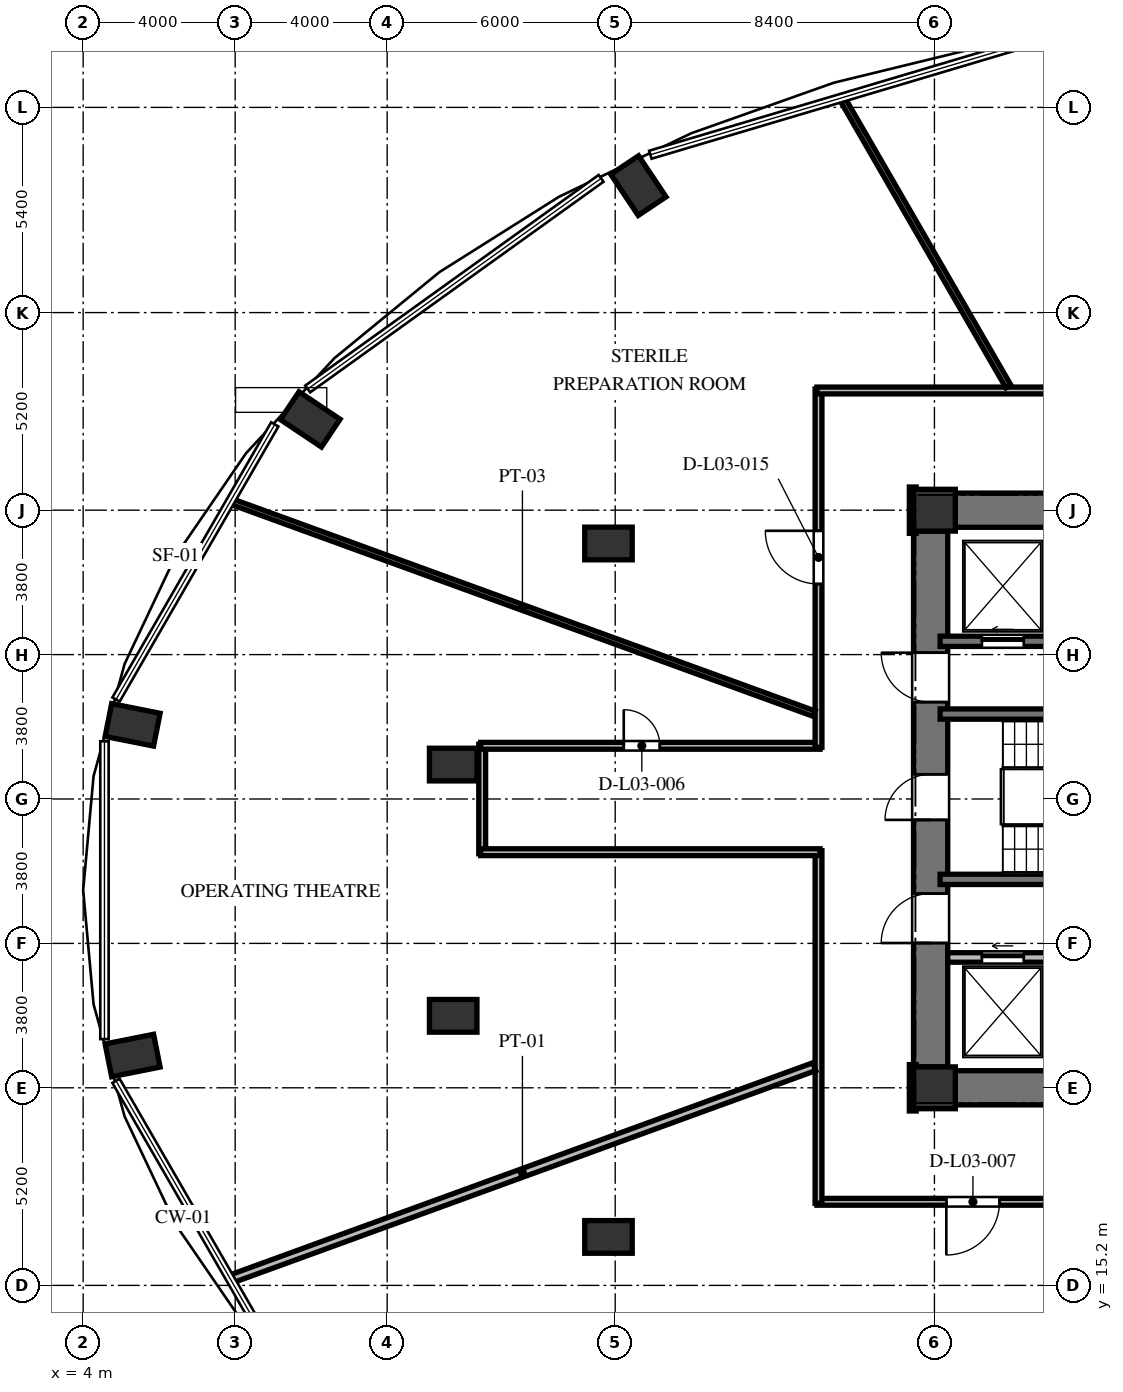
"""IFC4 building model, lengths in metres.
Left out: names, types, materials, properties, quantities, classifications, styles, units other than length and angle.
Written with IfcOpenShell. Run it as: python <this file> out.ifc"""

import sys

from ifc_helpers import new_model, si_unit, direction, frame, frame_2d, origin, origin_2d, place, context, subcontext, project, spatial, rectangle, extrude, element, fill, save


model = new_model("IFC4")
c1 = context("Model", 3, precision=1e-05, world=origin(), true_north=direction((0.0, 1.0)))
c2 = subcontext(c1, "Body", "Model", "MODEL_VIEW")
j1 = project(units=[si_unit("LENGTHUNIT", "METRE"), si_unit("PLANEANGLEUNIT", "RADIAN")], contexts=[c1])
p1 = place(None, origin())
s1 = spatial("IfcSite", under=j1, at=p1, CompositionType="ELEMENT")
p2 = place(p1, origin())
s2 = spatial("IfcBuilding", under=s1, at=p2, CompositionType="ELEMENT")
p3 = place(p2, frame((0.0, 0.0, 15.6)))
s3 = spatial("IfcBuildingStorey", under=s2, at=p3, CompositionType="ELEMENT", Elevation=15.6)
for number, where, z_axis, x_axis in (
    (1, (18.611, 44.142, 0.0), (0.0, 0.0, 1.0), (-0.556, 0.831, 0.0)),
    (2, (9.975, 37.989, 0.0), (0.0, 0.0, 1.0), (-0.831, 0.556, 0.0)),
    (3, (5.302, 29.95, 0.0), (0.0, 0.0, 1.0), (-0.981, 0.195, 0.0)),
    (4, (5.302, 21.25, 0.0), (0.0, 0.0, 1.0), (-0.981, -0.195, 0.0)),
):
    element("IfcColumn", number, at=place(p3, frame(where, z_axis=z_axis, x_axis=x_axis)), inside=s3, PredefinedType="COLUMN", context=c2, shape_type="SweptSolid", body=[
        extrude(rectangle(XDim=1.3, YDim=0.88, at=origin_2d()), origin(), (0.0, 0.0, 1.0), 4.8),
    ])
for number, where, z_axis, x_axis in (
    (5, (26.4, 20.4, 0.0), (0.0, 0.0, 1.0), (1.0, 0.0, 0.0)),
    (6, (26.4, 35.6, 0.0), (0.0, 0.0, 1.0), (1.0, 0.0, 0.0)),
):
    element("IfcColumn", number, at=place(p3, frame(where, z_axis=z_axis, x_axis=x_axis)), inside=s3, PredefinedType="COLUMN", context=c2, shape_type="SweptSolid", body=[
        extrude(rectangle(XDim=1.1, YDim=1.1, at=origin_2d()), origin(), (0.0, 0.0, 1.0), 4.8),
    ])
for number, where, z_axis, x_axis in (
    (7, (17.823, 34.724, 0.0), (0.0, 0.0, 1.0), (1.0, 0.0, 0.0)),
    (8, (13.737, 28.906, 0.0), (0.0, 0.0, 1.0), (1.0, 0.0, 0.0)),
    (9, (13.737, 22.294, 0.0), (0.0, 0.0, 1.0), (1.0, 0.0, 0.0)),
    (10, (17.823, 16.476, 0.0), (0.0, 0.0, 1.0), (1.0, 0.0, 0.0)),
):
    element("IfcColumn", number, at=place(p3, frame(where, z_axis=z_axis, x_axis=x_axis)), inside=s3, PredefinedType="COLUMN", context=c2, shape_type="SweptSolid", body=[
        extrude(rectangle(XDim=1.25, YDim=0.86, at=origin_2d()), origin(), (0.0, 0.0, 1.0), 4.8),
    ])
p4 = place(p3, frame((26.3, 20.95, 0.0), z_axis=(0.0, 0.0, 1.0), x_axis=(0.0, 1.0, 0.0)))
e11 = element("IfcWall", 11, at=p4, inside=s3, PredefinedType="SHEAR", context=c2, shape_type="SweptSolid", body=[
    extrude(rectangle(XDim=14.1, YDim=0.9, at=frame_2d((7.05, 0.0))), origin(), (0.0, 0.0, 1.0), 4.8),
])
p5 = place(p4, frame((6.5, 0.0, 0.0)))
e12 = element("IfcOpeningElement", 12, at=p5, cuts=e11, PredefinedType="OPENING", context=c2, shape_type="SweptSolid", body=[
    extrude(rectangle(XDim=1.2, YDim=2.15, at=frame_2d((0.6, 1.075))), frame((0.0, 0.46, 0.0), z_axis=(0.0, -1.0, 0.0), x_axis=(1.0, 0.0, 0.0)), (0.0, 0.0, 1.0), 0.92),
])
p6 = place(p4, frame((9.6, 0.0, 0.0)))
e13 = element("IfcOpeningElement", 13, at=p6, cuts=e11, PredefinedType="OPENING", context=c2, shape_type="SweptSolid", body=[
    extrude(rectangle(XDim=1.3, YDim=2.2, at=frame_2d((0.65, 1.1))), frame((0.0, 0.46, 0.0), z_axis=(0.0, -1.0, 0.0), x_axis=(1.0, 0.0, 0.0)), (0.0, 0.0, 1.0), 0.92),
])
p7 = place(p4, frame((3.26, 0.0, 0.0)))
e14 = element("IfcOpeningElement", 14, at=p7, cuts=e11, PredefinedType="OPENING", context=c2, shape_type="SweptSolid", body=[
    extrude(rectangle(XDim=1.3, YDim=2.2, at=frame_2d((0.65, 1.1))), frame((0.0, 0.46, 0.0), z_axis=(0.0, -1.0, 0.0), x_axis=(1.0, 0.0, 0.0)), (0.0, 0.0, 1.0), 0.92),
])
for number, where, z_axis, x_axis in (
    (15, (26.95, 20.4, 0.0), (0.0, 0.0, 1.0), (1.0, 0.0, 0.0)),
    (16, (26.95, 35.6, 0.0), (0.0, 0.0, 1.0), (1.0, 0.0, 0.0)),
):
    element("IfcWall", number, at=place(p3, frame(where, z_axis=z_axis, x_axis=x_axis)), inside=s3, PredefinedType="SHEAR", context=c2, shape_type="SweptSolid", body=[
        extrude(rectangle(XDim=5.3, YDim=0.9, at=frame_2d((2.65, 0.0))), origin(), (0.0, 0.0, 1.0), 4.8),
    ])
for number, where, z_axis, x_axis in (
    (17, (26.55, 30.235, 0.0), (0.0, 0.0, 1.0), (1.0, 0.0, 0.0)),
    (18, (26.55, 25.885, 0.0), (0.0, 0.0, 1.0), (1.0, 0.0, 0.0)),
):
    element("IfcWall", number, at=place(p3, frame(where, z_axis=z_axis, x_axis=x_axis)), inside=s3, PredefinedType="SHEAR", context=c2, shape_type="SweptSolid", body=[
        extrude(rectangle(XDim=7.985, YDim=0.27, at=frame_2d((3.992, 0.0))), origin(), (0.0, 0.0, 1.0), 4.8),
    ])
p8 = place(p3, frame((26.55, 32.15, 0.0), z_axis=(0.0, 0.0, 1.0), x_axis=(1.0, 0.0, 0.0)))
e19 = element("IfcWall", 19, at=p8, inside=s3, PredefinedType="SHEAR", context=c2, shape_type="SweptSolid", body=[
    extrude(rectangle(XDim=16.4, YDim=0.27, at=frame_2d((8.2, 0.0))), origin(), (0.0, 0.0, 1.0), 4.8),
])
p9 = place(p8, frame((1.1, 0.0, 0.0)))
e20 = element("IfcOpeningElement", 20, at=p9, cuts=e19, PredefinedType="OPENING", context=c2, shape_type="SweptSolid", body=[
    extrude(rectangle(XDim=1.1, YDim=2.2, at=frame_2d((0.55, 1.1))), frame((0.0, 0.145, 0.0), z_axis=(0.0, -1.0, 0.0), x_axis=(1.0, 0.0, 0.0)), (0.0, 0.0, 1.0), 0.29),
])
p10 = place(p8, frame((3.7, 0.0, 0.0)))
e21 = element("IfcOpeningElement", 21, at=p10, cuts=e19, PredefinedType="OPENING", context=c2, shape_type="SweptSolid", body=[
    extrude(rectangle(XDim=1.1, YDim=2.2, at=frame_2d((0.55, 1.1))), frame((0.0, 0.145, 0.0), z_axis=(0.0, -1.0, 0.0), x_axis=(1.0, 0.0, 0.0)), (0.0, 0.0, 1.0), 0.29),
])
p11 = place(p8, frame((6.5, 0.0, 0.0)))
e22 = element("IfcOpeningElement", 22, at=p11, cuts=e19, PredefinedType="OPENING", context=c2, shape_type="SweptSolid", body=[
    extrude(rectangle(XDim=1.1, YDim=2.2, at=frame_2d((0.55, 1.1))), frame((0.0, 0.145, 0.0), z_axis=(0.0, -1.0, 0.0), x_axis=(1.0, 0.0, 0.0)), (0.0, 0.0, 1.0), 0.29),
])
p12 = place(p8, frame((9.1, 0.0, 0.0)))
e23 = element("IfcOpeningElement", 23, at=p12, cuts=e19, PredefinedType="OPENING", context=c2, shape_type="SweptSolid", body=[
    extrude(rectangle(XDim=1.1, YDim=2.2, at=frame_2d((0.55, 1.1))), frame((0.0, 0.145, 0.0), z_axis=(0.0, -1.0, 0.0), x_axis=(1.0, 0.0, 0.0)), (0.0, 0.0, 1.0), 0.29),
])
p13 = place(p8, frame((11.9, 0.0, 0.0)))
e24 = element("IfcOpeningElement", 24, at=p13, cuts=e19, PredefinedType="OPENING", context=c2, shape_type="SweptSolid", body=[
    extrude(rectangle(XDim=1.1, YDim=2.2, at=frame_2d((0.55, 1.1))), frame((0.0, 0.145, 0.0), z_axis=(0.0, -1.0, 0.0), x_axis=(1.0, 0.0, 0.0)), (0.0, 0.0, 1.0), 0.29),
])
p14 = place(p8, frame((14.5, 0.0, 0.0)))
e25 = element("IfcOpeningElement", 25, at=p14, cuts=e19, PredefinedType="OPENING", context=c2, shape_type="SweptSolid", body=[
    extrude(rectangle(XDim=1.1, YDim=2.2, at=frame_2d((0.55, 1.1))), frame((0.0, 0.145, 0.0), z_axis=(0.0, -1.0, 0.0), x_axis=(1.0, 0.0, 0.0)), (0.0, 0.0, 1.0), 0.29),
])
p15 = place(p3, frame((26.75, 23.83, 0.0), z_axis=(0.0, 0.0, 1.0), x_axis=(1.0, 0.0, 0.0)))
e26 = element("IfcWall", 26, at=p15, inside=s3, PredefinedType="SOLIDWALL", context=c2, shape_type="SweptSolid", body=[
    extrude(rectangle(XDim=16.2, YDim=0.25, at=frame_2d((8.1, 0.0))), origin(), (0.0, 0.0, 1.0), 4.52),
])
p16 = place(p15, frame((0.9, 0.0, 0.0)))
e27 = element("IfcOpeningElement", 27, at=p16, cuts=e26, PredefinedType="OPENING", context=c2, shape_type="SweptSolid", body=[
    extrude(rectangle(XDim=1.1, YDim=2.2, at=frame_2d((0.55, 1.1))), frame((0.0, 0.135, 0.0), z_axis=(0.0, -1.0, 0.0), x_axis=(1.0, 0.0, 0.0)), (0.0, 0.0, 1.0), 0.27),
])
p17 = place(p15, frame((3.5, 0.0, 0.0)))
e28 = element("IfcOpeningElement", 28, at=p17, cuts=e26, PredefinedType="OPENING", context=c2, shape_type="SweptSolid", body=[
    extrude(rectangle(XDim=1.1, YDim=2.2, at=frame_2d((0.55, 1.1))), frame((0.0, 0.135, 0.0), z_axis=(0.0, -1.0, 0.0), x_axis=(1.0, 0.0, 0.0)), (0.0, 0.0, 1.0), 0.27),
])
p18 = place(p15, frame((6.3, 0.0, 0.0)))
e29 = element("IfcOpeningElement", 29, at=p18, cuts=e26, PredefinedType="OPENING", context=c2, shape_type="SweptSolid", body=[
    extrude(rectangle(XDim=1.1, YDim=2.2, at=frame_2d((0.55, 1.1))), frame((0.0, 0.135, 0.0), z_axis=(0.0, -1.0, 0.0), x_axis=(1.0, 0.0, 0.0)), (0.0, 0.0, 1.0), 0.27),
])
p19 = place(p15, frame((8.9, 0.0, 0.0)))
e30 = element("IfcOpeningElement", 30, at=p19, cuts=e26, PredefinedType="OPENING", context=c2, shape_type="SweptSolid", body=[
    extrude(rectangle(XDim=1.1, YDim=2.2, at=frame_2d((0.55, 1.1))), frame((0.0, 0.135, 0.0), z_axis=(0.0, -1.0, 0.0), x_axis=(1.0, 0.0, 0.0)), (0.0, 0.0, 1.0), 0.27),
])
p20 = place(p15, frame((11.7, 0.0, 0.0)))
e31 = element("IfcOpeningElement", 31, at=p20, cuts=e26, PredefinedType="OPENING", context=c2, shape_type="SweptSolid", body=[
    extrude(rectangle(XDim=1.1, YDim=2.2, at=frame_2d((0.55, 1.1))), frame((0.0, 0.135, 0.0), z_axis=(0.0, -1.0, 0.0), x_axis=(1.0, 0.0, 0.0)), (0.0, 0.0, 1.0), 0.27),
])
p21 = place(p15, frame((14.15, 0.0, 0.0)))
e32 = element("IfcOpeningElement", 32, at=p21, cuts=e26, PredefinedType="OPENING", context=c2, shape_type="SweptSolid", body=[
    extrude(rectangle(XDim=1.4, YDim=2.3, at=frame_2d((0.7, 1.15))), frame((0.0, 0.135, 0.0), z_axis=(0.0, -1.0, 0.0), x_axis=(1.0, 0.0, 0.0)), (0.0, 0.0, 1.0), 0.27),
])
p22 = place(p3, frame((14.5, 26.56, 0.0), z_axis=(0.0, 0.0, 1.0), x_axis=(0.0, 1.0, 0.0)))
e33 = element("IfcWall", 33, at=p22, inside=s3, PredefinedType="PARTITIONING", context=c2, shape_type="SweptSolid", body=[
    extrude(rectangle(XDim=2.88, YDim=0.18, at=frame_2d((1.44, 0.0))), origin(), (0.0, 0.0, 1.0), 4.52),
])
p23 = place(p3, frame((14.46, 29.4, 0.0), z_axis=(0.0, 0.0, 1.0), x_axis=(1.0, 0.0, 0.0)))
e34 = element("IfcWall", 34, at=p23, inside=s3, PredefinedType="PARTITIONING", context=c2, shape_type="SweptSolid", body=[
    extrude(rectangle(XDim=8.93, YDim=0.18, at=frame_2d((4.465, 0.0))), origin(), (0.0, 0.0, 1.0), 4.52),
])
p24 = place(p23, frame((3.765, 0.0, 0.0)))
e35 = element("IfcOpeningElement", 35, at=p24, cuts=e34, PredefinedType="OPENING", context=c2, shape_type="SweptSolid", body=[
    extrude(rectangle(XDim=0.95, YDim=2.1, at=frame_2d((0.475, 1.05))), frame((0.0, 0.1, 0.0), z_axis=(0.0, -1.0, 0.0), x_axis=(1.0, 0.0, 0.0)), (0.0, 0.0, 1.0), 0.2),
])
p25 = place(p3, frame((23.35, 29.36, 0.0), z_axis=(0.0, 0.0, 1.0), x_axis=(0.0, 1.0, 0.0)))
e36 = element("IfcWall", 36, at=p25, inside=s3, PredefinedType="PARTITIONING", context=c2, shape_type="SweptSolid", body=[
    extrude(rectangle(XDim=9.43, YDim=0.18, at=frame_2d((4.715, 0.0))), origin(), (0.0, 0.0, 1.0), 4.52),
])
p26 = place(p25, frame((4.298, 0.0, 0.0)))
e37 = element("IfcOpeningElement", 37, at=p26, cuts=e36, PredefinedType="OPENING", context=c2, shape_type="SweptSolid", body=[
    extrude(rectangle(XDim=1.4, YDim=2.2, at=frame_2d((0.7, 1.1))), frame((0.0, 0.1, 0.0), z_axis=(0.0, -1.0, 0.0), x_axis=(1.0, 0.0, 0.0)), (0.0, 0.0, 1.0), 0.2),
])
p27 = place(p3, frame((23.31, 38.75, 0.0), z_axis=(0.0, 0.0, 1.0), x_axis=(1.0, 0.0, 0.0)))
e38 = element("IfcWall", 38, at=p27, inside=s3, PredefinedType="PARTITIONING", context=c2, shape_type="SweptSolid", body=[
    extrude(rectangle(XDim=29.88, YDim=0.18, at=frame_2d((14.94, 0.0))), origin(), (0.0, 0.0, 1.0), 4.52),
])
p28 = place(p27, frame((22.324, 0.0, 0.0)))
e39 = element("IfcOpeningElement", 39, at=p28, cuts=e38, PredefinedType="OPENING", context=c2, shape_type="SweptSolid", body=[
    extrude(rectangle(XDim=1.05, YDim=2.15, at=frame_2d((0.525, 1.075))), frame((0.0, 0.1, 0.0), z_axis=(0.0, -1.0, 0.0), x_axis=(1.0, 0.0, 0.0)), (0.0, 0.0, 1.0), 0.2),
])
p29 = place(p27, frame((11.015, 0.0, 0.0)))
e40 = element("IfcOpeningElement", 40, at=p29, cuts=e38, PredefinedType="OPENING", context=c2, shape_type="SweptSolid", body=[
    extrude(rectangle(XDim=0.95, YDim=2.1, at=frame_2d((0.475, 1.05))), frame((0.0, 0.1, 0.0), z_axis=(0.0, -1.0, 0.0), x_axis=(1.0, 0.0, 0.0)), (0.0, 0.0, 1.0), 0.2),
])
for number, where, z_axis, x_axis in (
    (41, (25.83, 36.21, 0.0), (0.0, 0.0, 1.0), (0.0, -1.0, 0.0)),
    (42, (25.83, 21.01, 0.0), (0.0, 0.0, 1.0), (0.0, -1.0, 0.0)),
):
    element("IfcWall", number, at=place(p3, frame(where, z_axis=z_axis, x_axis=x_axis)), inside=s3, PredefinedType="PARTITIONING", context=c2, shape_type="SweptSolid", body=[
        extrude(rectangle(XDim=1.22, YDim=0.18, at=frame_2d((0.61, 0.0))), origin(), (0.0, 0.0, 1.0), 4.52),
    ])
p30 = place(p3, frame((45.24, 17.4, 0.0), z_axis=(0.0, 0.0, 1.0), x_axis=(-1.0, 0.0, 0.0)))
e43 = element("IfcWall", 43, at=p30, inside=s3, PredefinedType="PARTITIONING", context=c2, shape_type="SweptSolid", body=[
    extrude(rectangle(XDim=21.93, YDim=0.18, at=frame_2d((10.965, 0.0))), origin(), (0.0, 0.0, 1.0), 4.52),
])
p31 = place(p30, frame((17.127, 0.0, 0.0)))
e44 = element("IfcOpeningElement", 44, at=p31, cuts=e43, PredefinedType="OPENING", context=c2, shape_type="SweptSolid", body=[
    extrude(rectangle(XDim=1.4, YDim=2.2, at=frame_2d((0.7, 1.1))), frame((0.0, 0.1, 0.0), z_axis=(0.0, -1.0, 0.0), x_axis=(1.0, 0.0, 0.0)), (0.0, 0.0, 1.0), 0.2),
])
p32 = place(p30, frame((9.071, 0.0, 0.0)))
e45 = element("IfcOpeningElement", 45, at=p32, cuts=e43, PredefinedType="OPENING", context=c2, shape_type="SweptSolid", body=[
    extrude(rectangle(XDim=0.95, YDim=2.1, at=frame_2d((0.475, 1.05))), frame((0.0, 0.1, 0.0), z_axis=(0.0, -1.0, 0.0), x_axis=(1.0, 0.0, 0.0)), (0.0, 0.0, 1.0), 0.2),
])
p33 = place(p30, frame((2.177, 0.0, 0.0)))
e46 = element("IfcOpeningElement", 46, at=p33, cuts=e43, PredefinedType="OPENING", context=c2, shape_type="SweptSolid", body=[
    extrude(rectangle(XDim=1.4, YDim=2.2, at=frame_2d((0.7, 1.1))), frame((0.0, 0.1, 0.0), z_axis=(0.0, -1.0, 0.0), x_axis=(1.0, 0.0, 0.0)), (0.0, 0.0, 1.0), 0.2),
])
p34 = place(p3, frame((23.35, 17.36, 0.0), z_axis=(0.0, 0.0, 1.0), x_axis=(0.0, 1.0, 0.0)))
e47 = element("IfcWall", 47, at=p34, inside=s3, PredefinedType="PARTITIONING", context=c2, shape_type="SweptSolid", body=[
    extrude(rectangle(XDim=9.28, YDim=0.18, at=frame_2d((4.64, 0.0))), origin(), (0.0, 0.0, 1.0), 4.52),
])
p35 = place(p3, frame((23.39, 26.6, 0.0), z_axis=(0.0, 0.0, 1.0), x_axis=(-1.0, 0.0, 0.0)))
e48 = element("IfcWall", 48, at=p35, inside=s3, PredefinedType="PARTITIONING", context=c2, shape_type="SweptSolid", body=[
    extrude(rectangle(XDim=8.93, YDim=0.18, at=frame_2d((4.465, 0.0))), origin(), (0.0, 0.0, 1.0), 4.52),
])
p36 = place(p3, frame((28.346, 38.857, 0.0), z_axis=(0.0, 0.0, 1.0), x_axis=(-0.500008731563, 0.866020362555, 0.0)))
e49 = element("IfcWall", 49, at=p36, inside=s3, PredefinedType="PARTITIONING", context=c2, shape_type="SweptSolid", body=[
    extrude(rectangle(XDim=8.76, YDim=0.15, at=frame_2d((4.38, 0.0))), origin(), (0.0, 0.0, 1.0), 4.52),
])
p37 = place(p3, frame((23.239, 30.245, 0.0), z_axis=(0.0, 0.0, 1.0), x_axis=(-0.939691331374, 0.342023685934, 0.0)))
e50 = element("IfcWall", 50, at=p37, inside=s3, PredefinedType="PARTITIONING", context=c2, shape_type="SweptSolid", body=[
    extrude(rectangle(XDim=16.345, YDim=0.15, at=frame_2d((8.172, 0.0))), origin(), (0.0, 0.0, 1.0), 4.52),
])
p38 = place(p3, frame((23.239, 20.955, 0.0), z_axis=(0.0, 0.0, 1.0), x_axis=(-0.939696131956, -0.342010496311, 0.0)))
e51 = element("IfcWall", 51, at=p38, inside=s3, PredefinedType="PARTITIONING", context=c2, shape_type="SweptSolid", body=[
    extrude(rectangle(XDim=16.345, YDim=0.22, at=frame_2d((8.172, 0.0))), origin(), (0.0, 0.0, 1.0), 4.52),
])
p39 = place(p3, frame((31.204, 17.293, 0.0), z_axis=(0.0, 0.0, 1.0), x_axis=(-0.500008108359, -0.866020722371, 0.0)))
e52 = element("IfcWall", 52, at=p39, inside=s3, PredefinedType="PARTITIONING", context=c2, shape_type="SweptSolid", body=[
    extrude(rectangle(XDim=14.476, YDim=0.15, at=frame_2d((7.238, 0.0))), origin(), (0.0, 0.0, 1.0), 4.52),
])
p40 = place(p5, origin())
e53 = element("IfcDoor", 53, at=p40, inside=s3, OperationType="SINGLE_SWING_LEFT", PredefinedType="DOOR", context=c2, shape_type="SweptSolid", body=[
    extrude(rectangle(XDim=1.2, YDim=2.15, at=frame_2d((0.6, 1.075))), frame((0.0, 0.025, 0.0), z_axis=(0.0, -1.0, 0.0), x_axis=(1.0, 0.0, 0.0)), (0.0, 0.0, 1.0), 0.05),
])
fill(e12, e53)
p41 = place(p6, origin())
e54 = element("IfcDoor", 54, at=p41, inside=s3, OperationType="SINGLE_SWING_RIGHT", PredefinedType="DOOR", context=c2, shape_type="SweptSolid", body=[
    extrude(rectangle(XDim=1.3, YDim=2.2, at=frame_2d((0.65, 1.1))), frame((0.0, 0.025, 0.0), z_axis=(0.0, -1.0, 0.0), x_axis=(1.0, 0.0, 0.0)), (0.0, 0.0, 1.0), 0.05),
])
fill(e13, e54)
p42 = place(p7, origin())
e55 = element("IfcDoor", 55, at=p42, inside=s3, OperationType="SINGLE_SWING_LEFT", PredefinedType="DOOR", context=c2, shape_type="SweptSolid", body=[
    extrude(rectangle(XDim=1.3, YDim=2.2, at=frame_2d((0.65, 1.1))), frame((0.0, 0.025, 0.0), z_axis=(0.0, -1.0, 0.0), x_axis=(1.0, 0.0, 0.0)), (0.0, 0.0, 1.0), 0.05),
])
fill(e14, e55)
p43 = place(p9, origin())
e56 = element("IfcDoor", 56, at=p43, inside=s3, OperationType="SLIDING_TO_LEFT", PredefinedType="DOOR", context=c2, shape_type="SweptSolid", body=[
    extrude(rectangle(XDim=1.1, YDim=2.2, at=frame_2d((0.55, 1.1))), frame((0.0, 0.025, 0.0), z_axis=(0.0, -1.0, 0.0), x_axis=(1.0, 0.0, 0.0)), (0.0, 0.0, 1.0), 0.05),
])
fill(e20, e56)
p44 = place(p16, origin())
e57 = element("IfcDoor", 57, at=p44, inside=s3, OperationType="SLIDING_TO_LEFT", PredefinedType="DOOR", context=c2, shape_type="SweptSolid", body=[
    extrude(rectangle(XDim=1.1, YDim=2.2, at=frame_2d((0.55, 1.1))), frame((0.0, 0.025, 0.0), z_axis=(0.0, -1.0, 0.0), x_axis=(1.0, 0.0, 0.0)), (0.0, 0.0, 1.0), 0.05),
])
fill(e27, e57)
p45 = place(p24, origin())
e58 = element("IfcDoor", 58, at=p45, inside=s3, OperationType="SINGLE_SWING_LEFT", PredefinedType="DOOR", context=c2, shape_type="SweptSolid", body=[
    extrude(rectangle(XDim=0.95, YDim=2.1, at=frame_2d((0.475, 1.05))), frame((0.0, 0.025, 0.0), z_axis=(0.0, -1.0, 0.0), x_axis=(1.0, 0.0, 0.0)), (0.0, 0.0, 1.0), 0.05),
])
fill(e35, e58)
p46 = place(p31, origin())
e59 = element("IfcDoor", 59, at=p46, inside=s3, OperationType="SINGLE_SWING_RIGHT", PredefinedType="DOOR", context=c2, shape_type="SweptSolid", body=[
    extrude(rectangle(XDim=1.4, YDim=2.2, at=frame_2d((0.7, 1.1))), frame((0.0, 0.025, 0.0), z_axis=(0.0, -1.0, 0.0), x_axis=(1.0, 0.0, 0.0)), (0.0, 0.0, 1.0), 0.05),
])
fill(e44, e59)
p47 = place(p26, origin())
e60 = element("IfcDoor", 60, at=p47, inside=s3, OperationType="SINGLE_SWING_RIGHT", PredefinedType="DOOR", context=c2, shape_type="SweptSolid", body=[
    extrude(rectangle(XDim=1.4, YDim=2.2, at=frame_2d((0.7, 1.1))), frame((0.0, 0.025, 0.0), z_axis=(0.0, -1.0, 0.0), x_axis=(1.0, 0.0, 0.0)), (0.0, 0.0, 1.0), 0.05),
])
fill(e37, e60)
save(model, sys.argv[1])
